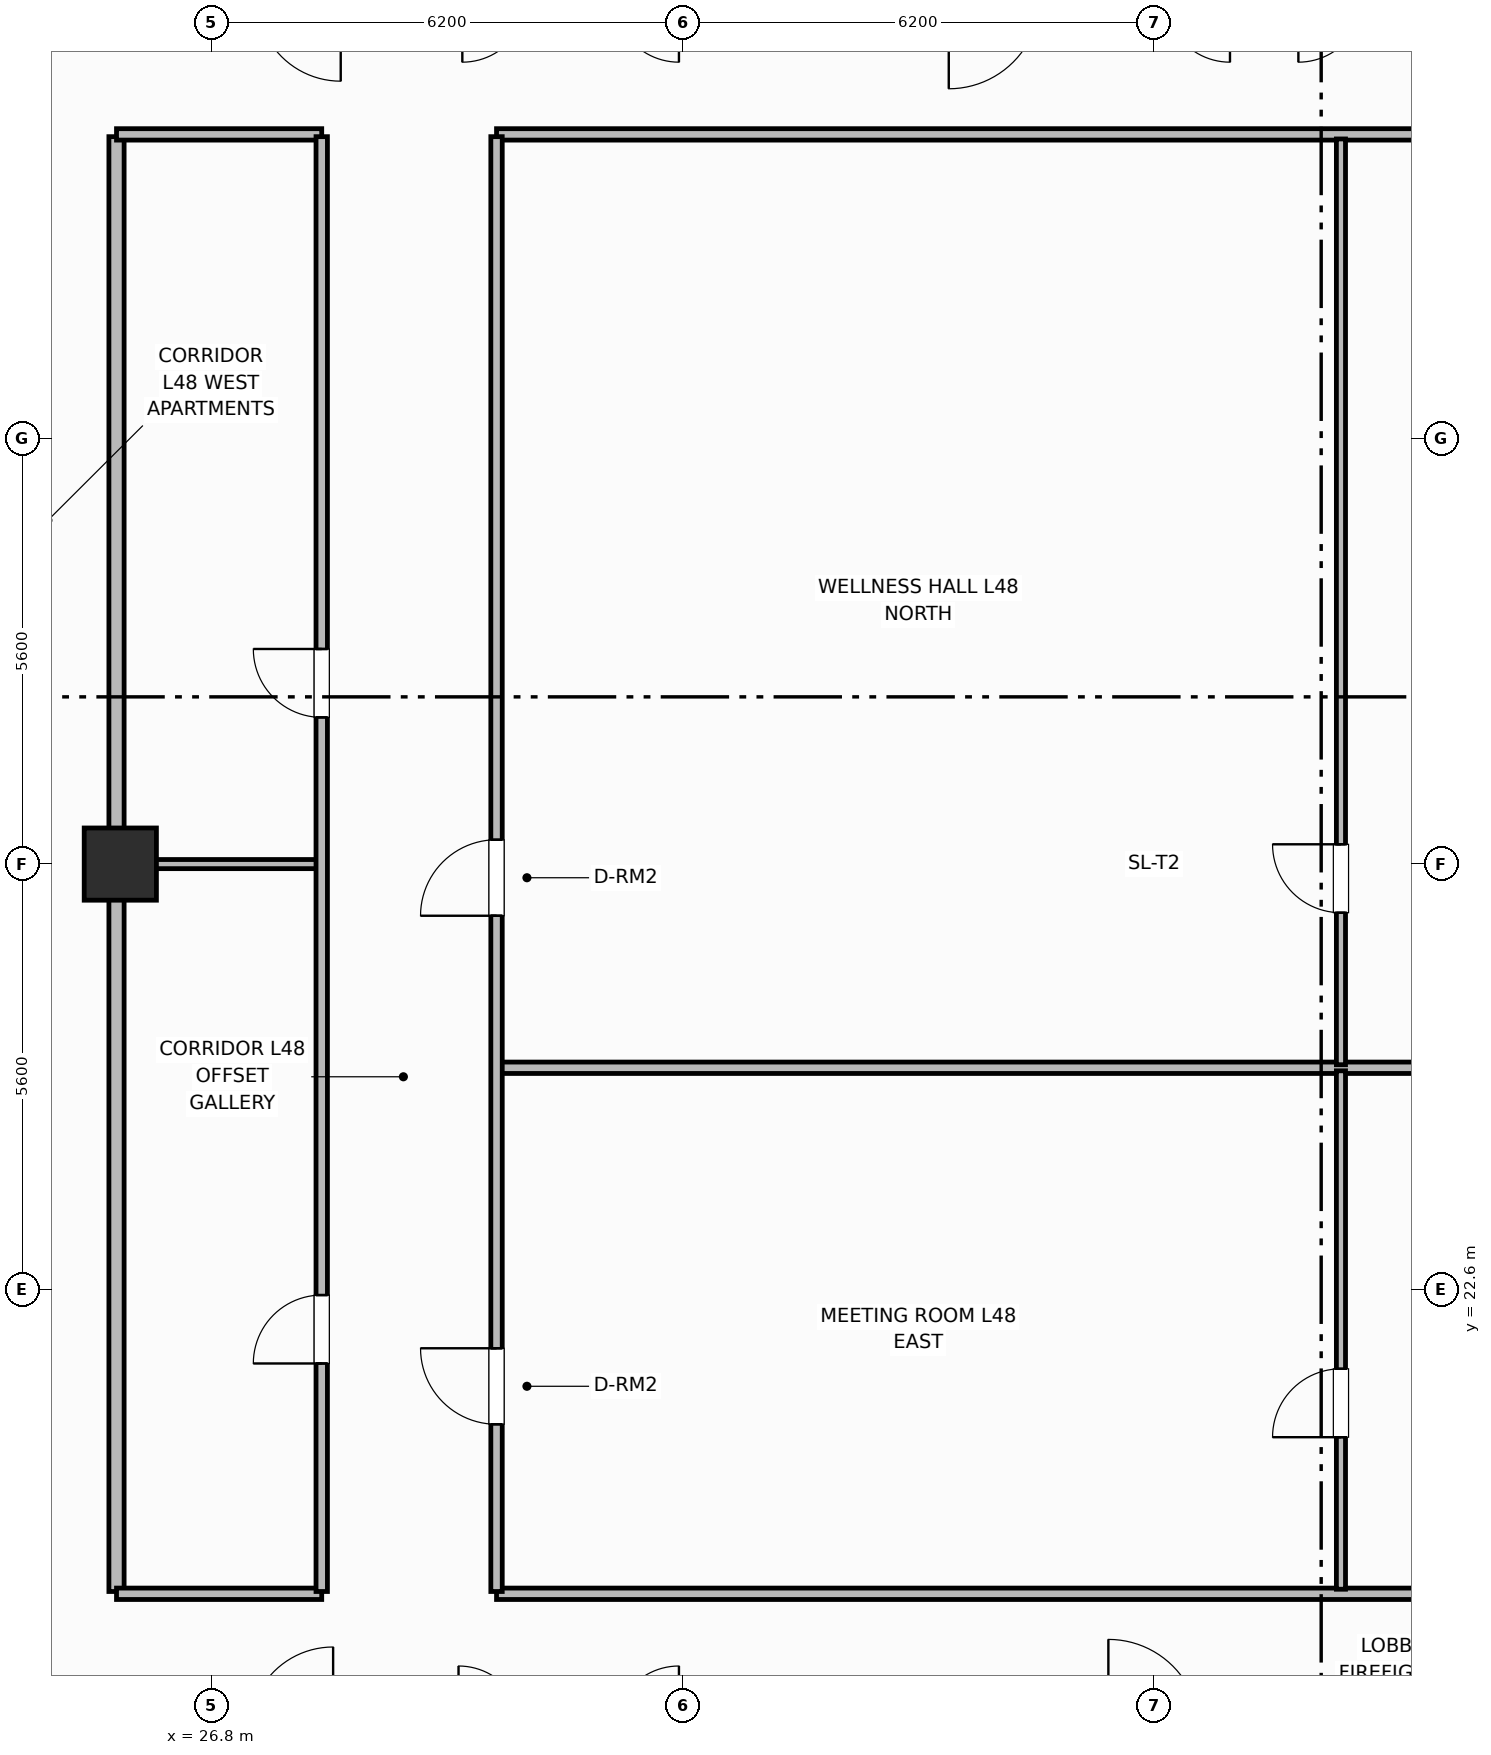
"""IFC4 building model, lengths in metres.
Left out: names, types, materials, properties, quantities, classifications, styles, units other than length and angle.
Written with IfcOpenShell. Run it as: python <this file> out.ifc"""

import sys

from ifc_helpers import new_model, si_unit, direction, frame, frame_2d, origin, origin_2d, place, context, subcontext, project, spatial, rectangle, extrude, element, fill, save


model = new_model("IFC4")
c1 = context("Model", 3, precision=1e-05, world=origin(), true_north=direction((0.0, 1.0)))
c2 = subcontext(c1, "Body", "Model", "MODEL_VIEW")
j1 = project(units=[si_unit("LENGTHUNIT", "METRE"), si_unit("PLANEANGLEUNIT", "RADIAN")], contexts=[c1])
p1 = place(None, origin())
s1 = spatial("IfcSite", under=j1, at=p1, CompositionType="ELEMENT")
p2 = place(p1, origin())
s2 = spatial("IfcBuilding", under=s1, at=p2, CompositionType="ELEMENT")
p3 = place(p2, frame((0.0, 0.0, 192.2)))
s3 = spatial("IfcBuildingStorey", under=s2, at=p3, CompositionType="ELEMENT", Elevation=192.2)
p4 = place(p3, frame((25.6, 28.2, 0.0), z_axis=(0.0, 0.0, 1.0), x_axis=(1.0, 0.0, 0.0)))
e1 = element("IfcColumn", 1, at=p4, inside=s3, PredefinedType="COLUMN", context=c2, shape_type="SweptSolid", body=[
    extrude(rectangle(XDim=0.95, YDim=0.95, at=origin_2d()), origin(), (0.0, 0.0, 1.0), 3.7),
])
p5 = place(p3, frame((25.55, 18.63, 0.0), z_axis=(0.0, 0.0, 1.0), x_axis=(0.0, 1.0, 0.0)))
e2 = element("IfcWall", 2, at=p5, inside=s3, PredefinedType="PARTITIONING", context=c2, shape_type="SweptSolid", body=[
    extrude(rectangle(XDim=19.14, YDim=0.2, at=frame_2d((9.57, 0.0))), origin(), (0.0, 0.0, 1.0), 2.49),
])
p6 = place(p3, frame((25.55, 18.6, 0.0), z_axis=(0.0, 0.0, 1.0), x_axis=(1.0, 0.0, 0.0)))
e3 = element("IfcWall", 3, at=p6, inside=s3, PredefinedType="PARTITIONING", context=c2, shape_type="SweptSolid", body=[
    extrude(rectangle(XDim=2.7, YDim=0.15, at=frame_2d((1.35, 0.0))), origin(), (0.0, 0.0, 1.0), 2.49),
])
p7 = place(p3, frame((30.55, 18.6, 0.0), z_axis=(0.0, 0.0, 1.0), x_axis=(1.0, 0.0, 0.0)))
e4 = element("IfcWall", 4, at=p7, inside=s3, PredefinedType="PARTITIONING", context=c2, shape_type="SweptSolid", body=[
    extrude(rectangle(XDim=22.3, YDim=0.15, at=frame_2d((11.15, 0.0))), origin(), (0.0, 0.0, 1.0), 2.49),
])
p8 = place(p3, frame((25.55, 37.8, 0.0), z_axis=(0.0, 0.0, 1.0), x_axis=(1.0, 0.0, 0.0)))
e5 = element("IfcWall", 5, at=p8, inside=s3, PredefinedType="PARTITIONING", context=c2, shape_type="SweptSolid", body=[
    extrude(rectangle(XDim=2.7, YDim=0.15, at=frame_2d((1.35, 0.0))), origin(), (0.0, 0.0, 1.0), 2.49),
])
p9 = place(p3, frame((30.55, 37.8, 0.0), z_axis=(0.0, 0.0, 1.0), x_axis=(1.0, 0.0, 0.0)))
e6 = element("IfcWall", 6, at=p9, inside=s3, PredefinedType="PARTITIONING", context=c2, shape_type="SweptSolid", body=[
    extrude(rectangle(XDim=22.3, YDim=0.15, at=frame_2d((11.15, 0.0))), origin(), (0.0, 0.0, 1.0), 2.49),
])
p10 = place(p3, frame((25.6, 28.2, 0.0), z_axis=(0.0, 0.0, 1.0), x_axis=(1.0, 0.0, 0.0)))
e7 = element("IfcWall", 7, at=p10, inside=s3, PredefinedType="PARTITIONING", context=c2, shape_type="SweptSolid", body=[
    extrude(rectangle(XDim=2.66, YDim=0.12, at=frame_2d((1.33, 0.0))), origin(), (0.0, 0.0, 1.0), 2.49),
])
p11 = place(p3, frame((30.58, 25.521, 0.0), z_axis=(0.0, 0.0, 1.0), x_axis=(1.0, 0.0, 0.0)))
e8 = element("IfcWall", 8, at=p11, inside=s3, PredefinedType="PARTITIONING", context=c2, shape_type="SweptSolid", body=[
    extrude(rectangle(XDim=22.22, YDim=0.15, at=frame_2d((11.11, 0.0))), origin(), (0.0, 0.0, 1.0), 2.49),
])
p12 = place(p3, frame((41.66, 18.66, 0.0), z_axis=(0.0, 0.0, 1.0), x_axis=(0.0, 1.0, 0.0)))
e9 = element("IfcWall", 9, at=p12, inside=s3, PredefinedType="PARTITIONING", context=c2, shape_type="SweptSolid", body=[
    extrude(rectangle(XDim=6.821, YDim=0.12, at=frame_2d((3.41, 0.0))), origin(), (0.0, 0.0, 1.0), 2.49),
])
p13 = place(p12, frame((2.0, 0.0, 0.0)))
e10 = element("IfcOpeningElement", 10, at=p13, cuts=e9, PredefinedType="OPENING", context=c2, shape_type="SweptSolid", body=[
    extrude(rectangle(XDim=0.9, YDim=2.1, at=frame_2d((0.45, 1.05))), frame((0.0, 0.07, 0.0), z_axis=(0.0, -1.0, 0.0), x_axis=(1.0, 0.0, 0.0)), (0.0, 0.0, 1.0), 0.14),
])
p14 = place(p3, frame((41.66, 25.56, 0.0), z_axis=(0.0, 0.0, 1.0), x_axis=(0.0, 1.0, 0.0)))
e11 = element("IfcWall", 11, at=p14, inside=s3, PredefinedType="PARTITIONING", context=c2, shape_type="SweptSolid", body=[
    extrude(rectangle(XDim=12.18, YDim=0.12, at=frame_2d((6.09, 0.0))), origin(), (0.0, 0.0, 1.0), 2.49),
])
p15 = place(p14, frame((2.0, 0.0, 0.0)))
e12 = element("IfcOpeningElement", 12, at=p15, cuts=e11, PredefinedType="OPENING", context=c2, shape_type="SweptSolid", body=[
    extrude(rectangle(XDim=0.9, YDim=2.1, at=frame_2d((0.45, 1.05))), frame((0.0, 0.07, 0.0), z_axis=(0.0, -1.0, 0.0), x_axis=(1.0, 0.0, 0.0)), (0.0, 0.0, 1.0), 0.14),
])
p16 = place(p3, frame((28.25, 18.63, 0.0), z_axis=(0.0, 0.0, 1.0), x_axis=(0.0, 1.0, 0.0)))
e13 = element("IfcWall", 13, at=p16, inside=s3, PredefinedType="PARTITIONING", context=c2, shape_type="SweptSolid", body=[
    extrude(rectangle(XDim=19.14, YDim=0.15, at=frame_2d((9.57, 0.0))), origin(), (0.0, 0.0, 1.0), 2.49),
])
p17 = place(p16, frame((3.0, 0.0, 0.0)))
e14 = element("IfcOpeningElement", 14, at=p17, cuts=e13, PredefinedType="OPENING", context=c2, shape_type="SweptSolid", body=[
    extrude(rectangle(XDim=0.9, YDim=2.1, at=frame_2d((0.45, 1.05))), frame((0.0, 0.085, 0.0), z_axis=(0.0, -1.0, 0.0), x_axis=(1.0, 0.0, 0.0)), (0.0, 0.0, 1.0), 0.17),
])
p18 = place(p16, frame((11.5, 0.0, 0.0)))
e15 = element("IfcOpeningElement", 15, at=p18, cuts=e13, PredefinedType="OPENING", context=c2, shape_type="SweptSolid", body=[
    extrude(rectangle(XDim=0.9, YDim=2.1, at=frame_2d((0.45, 1.05))), frame((0.0, 0.085, 0.0), z_axis=(0.0, -1.0, 0.0), x_axis=(1.0, 0.0, 0.0)), (0.0, 0.0, 1.0), 0.17),
])
p19 = place(p3, frame((30.55, 18.63, 0.0), z_axis=(0.0, 0.0, 1.0), x_axis=(0.0, 1.0, 0.0)))
e16 = element("IfcWall", 16, at=p19, inside=s3, PredefinedType="PARTITIONING", context=c2, shape_type="SweptSolid", body=[
    extrude(rectangle(XDim=19.14, YDim=0.15, at=frame_2d((9.57, 0.0))), origin(), (0.0, 0.0, 1.0), 2.49),
])
p20 = place(p19, frame((2.2, 0.0, 0.0)))
e17 = element("IfcOpeningElement", 17, at=p20, cuts=e16, PredefinedType="OPENING", context=c2, shape_type="SweptSolid", body=[
    extrude(rectangle(XDim=1.0, YDim=2.15, at=frame_2d((0.5, 1.075))), frame((0.0, 0.085, 0.0), z_axis=(0.0, -1.0, 0.0), x_axis=(1.0, 0.0, 0.0)), (0.0, 0.0, 1.0), 0.17),
])
p21 = place(p19, frame((8.89, 0.0, 0.0)))
e18 = element("IfcOpeningElement", 18, at=p21, cuts=e16, PredefinedType="OPENING", context=c2, shape_type="SweptSolid", body=[
    extrude(rectangle(XDim=1.0, YDim=2.15, at=frame_2d((0.5, 1.075))), frame((0.0, 0.085, 0.0), z_axis=(0.0, -1.0, 0.0), x_axis=(1.0, 0.0, 0.0)), (0.0, 0.0, 1.0), 0.17),
])
p22 = place(p13, origin())
e19 = element("IfcDoor", 19, at=p22, inside=s3, OperationType="SINGLE_SWING_LEFT", PredefinedType="DOOR", context=c2, shape_type="SweptSolid", body=[
    extrude(rectangle(XDim=0.9, YDim=2.1, at=frame_2d((0.45, 1.05))), frame((0.0, 0.025, 0.0), z_axis=(0.0, -1.0, 0.0), x_axis=(1.0, 0.0, 0.0)), (0.0, 0.0, 1.0), 0.05),
])
fill(e10, e19)
p23 = place(p15, origin())
e20 = element("IfcDoor", 20, at=p23, inside=s3, OperationType="SINGLE_SWING_RIGHT", PredefinedType="DOOR", context=c2, shape_type="SweptSolid", body=[
    extrude(rectangle(XDim=0.9, YDim=2.1, at=frame_2d((0.45, 1.05))), frame((0.0, 0.025, 0.0), z_axis=(0.0, -1.0, 0.0), x_axis=(1.0, 0.0, 0.0)), (0.0, 0.0, 1.0), 0.05),
])
fill(e12, e20)
p24 = place(p17, origin())
e21 = element("IfcDoor", 21, at=p24, inside=s3, OperationType="SINGLE_SWING_LEFT", PredefinedType="DOOR", context=c2, shape_type="SweptSolid", body=[
    extrude(rectangle(XDim=0.9, YDim=2.1, at=frame_2d((0.45, 1.05))), frame((0.0, 0.025, 0.0), z_axis=(0.0, -1.0, 0.0), x_axis=(1.0, 0.0, 0.0)), (0.0, 0.0, 1.0), 0.05),
])
fill(e14, e21)
p25 = place(p18, origin())
e22 = element("IfcDoor", 22, at=p25, inside=s3, OperationType="SINGLE_SWING_RIGHT", PredefinedType="DOOR", context=c2, shape_type="SweptSolid", body=[
    extrude(rectangle(XDim=0.9, YDim=2.1, at=frame_2d((0.45, 1.05))), frame((0.0, 0.025, 0.0), z_axis=(0.0, -1.0, 0.0), x_axis=(1.0, 0.0, 0.0)), (0.0, 0.0, 1.0), 0.05),
])
fill(e15, e22)
p26 = place(p20, origin())
e23 = element("IfcDoor", 23, at=p26, inside=s3, OperationType="SINGLE_SWING_RIGHT", PredefinedType="DOOR", context=c2, shape_type="SweptSolid", body=[
    extrude(rectangle(XDim=1.0, YDim=2.15, at=frame_2d((0.5, 1.075))), frame((0.0, 0.025, 0.0), z_axis=(0.0, -1.0, 0.0), x_axis=(1.0, 0.0, 0.0)), (0.0, 0.0, 1.0), 0.05),
])
fill(e17, e23)
p27 = place(p21, origin())
e24 = element("IfcDoor", 24, at=p27, inside=s3, OperationType="SINGLE_SWING_LEFT", PredefinedType="DOOR", context=c2, shape_type="SweptSolid", body=[
    extrude(rectangle(XDim=1.0, YDim=2.15, at=frame_2d((0.5, 1.075))), frame((0.0, 0.025, 0.0), z_axis=(0.0, -1.0, 0.0), x_axis=(1.0, 0.0, 0.0)), (0.0, 0.0, 1.0), 0.05),
])
fill(e18, e24)
save(model, sys.argv[1])
